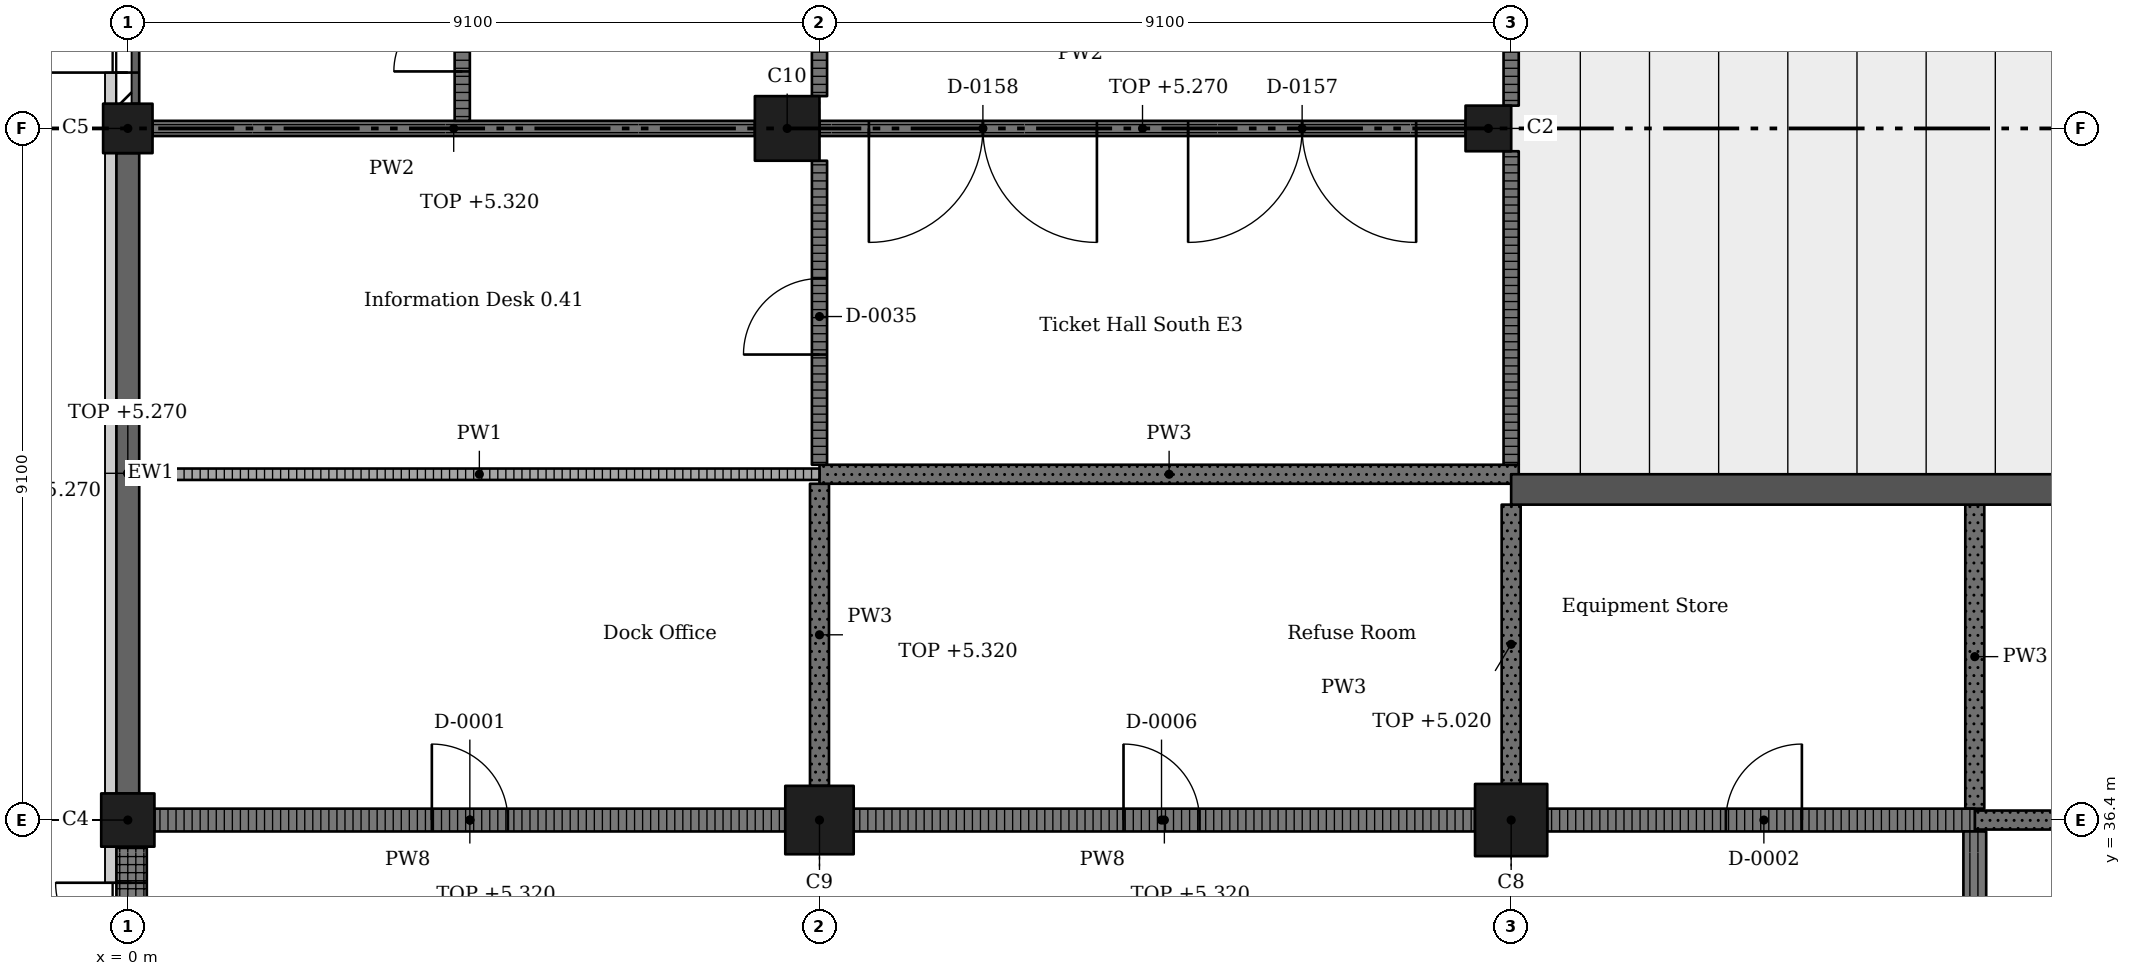
"""IFC4 building model, lengths in metres.
Left out: names, types, materials, properties, quantities, classifications, styles, units other than length and angle.
Written with IfcOpenShell. Run it as: python <this file> out.ifc"""

import sys

from ifc_helpers import new_model, si_unit, direction, frame, frame_2d, origin, origin_2d, place, context, subcontext, project, spatial, rectangle, extrude, element, fill, save


model = new_model("IFC4")
c1 = context("Model", 3, precision=1e-05, world=origin(), true_north=direction((0.0, 1.0)))
c2 = subcontext(c1, "Body", "Model", "MODEL_VIEW")
j1 = project(units=[si_unit("LENGTHUNIT", "METRE"), si_unit("PLANEANGLEUNIT", "RADIAN")], contexts=[c1])
p1 = place(None, origin())
s1 = spatial("IfcSite", under=j1, at=p1, CompositionType="ELEMENT")
p2 = place(p1, origin())
s2 = spatial("IfcBuilding", under=s1, at=p2, CompositionType="ELEMENT")
p3 = place(p2, origin())
s3 = spatial("IfcBuildingStorey", under=s2, at=p3, CompositionType="ELEMENT", Elevation=0.0)
p4 = place(p3, frame((0.0, 36.4, -0.4), z_axis=(0.0, 0.0, 1.0), x_axis=(1.0, 0.0, 0.0)))
e1 = element("IfcColumn", 1, at=p4, inside=s3, PredefinedType="COLUMN", context=c2, shape_type="SweptSolid", body=[
    extrude(rectangle(XDim=0.7, YDim=0.7, at=origin_2d()), origin(), (0.0, 0.0, 1.0), 6.77),
])
p5 = place(p3, frame((0.0, 45.5, -0.4), z_axis=(0.0, 0.0, 1.0), x_axis=(1.0, 0.0, 0.0)))
e2 = element("IfcColumn", 2, at=p5, inside=s3, PredefinedType="COLUMN", context=c2, shape_type="SweptSolid", body=[
    extrude(rectangle(XDim=0.65, YDim=0.65, at=origin_2d()), origin(), (0.0, 0.0, 1.0), 6.77),
])
p6 = place(p3, frame((9.1, 36.4, -0.4), z_axis=(0.0, 0.0, 1.0), x_axis=(1.0, 0.0, 0.0)))
e3 = element("IfcColumn", 3, at=p6, inside=s3, PredefinedType="COLUMN", context=c2, shape_type="SweptSolid", body=[
    extrude(rectangle(XDim=0.9, YDim=0.9, at=origin_2d()), origin(), (0.0, 0.0, 1.0), 6.77),
])
p7 = place(p3, frame((8.675, 45.5, -0.4), z_axis=(0.0, 0.0, 1.0), x_axis=(1.0, 0.0, 0.0)))
e4 = element("IfcColumn", 4, at=p7, inside=s3, PredefinedType="COLUMN", context=c2, shape_type="SweptSolid", body=[
    extrude(rectangle(XDim=0.85, YDim=0.85, at=origin_2d()), origin(), (0.0, 0.0, 1.0), 6.77),
])
p8 = place(p3, frame((18.2, 36.4, -0.4), z_axis=(0.0, 0.0, 1.0), x_axis=(1.0, 0.0, 0.0)))
e5 = element("IfcColumn", 5, at=p8, inside=s3, PredefinedType="COLUMN", context=c2, shape_type="SweptSolid", body=[
    extrude(rectangle(XDim=0.95, YDim=0.95, at=origin_2d()), origin(), (0.0, 0.0, 1.0), 6.77),
])
p9 = place(p3, frame((17.9, 45.5, -0.4), z_axis=(0.0, 0.0, 1.0), x_axis=(1.0, 0.0, 0.0)))
e6 = element("IfcColumn", 6, at=p9, inside=s3, PredefinedType="COLUMN", context=c2, shape_type="SweptSolid", body=[
    extrude(rectangle(XDim=0.6, YDim=0.6, at=origin_2d()), origin(), (0.0, 0.0, 1.0), 6.77),
])
p10 = place(p3, frame((36.4, 40.75, -0.4), z_axis=(0.0, 0.0, 1.0), x_axis=(-1.0, 0.0, 0.0)))
e7 = element("IfcWall", 7, at=p10, inside=s3, PredefinedType="SHEAR", context=c2, shape_type="SweptSolid", body=[
    extrude(rectangle(XDim=18.2, YDim=0.4, at=frame_2d((9.1, 0.0))), origin(), (0.0, 0.0, 1.0), 6.77),
])
p11 = place(p3, frame((0.0, 54.275, 0.0), z_axis=(0.0, 0.0, 1.0), x_axis=(0.0, -1.0, 0.0)))
e8 = element("IfcWall", 8, at=p11, inside=s3, PredefinedType="SOLIDWALL", context=c2, shape_type="SweptSolid", body=[
    extrude(rectangle(XDim=8.45, YDim=0.3, at=frame_2d((4.225, 0.0))), origin(), (0.0, 0.0, 1.0), 3.75),
])
p12 = place(p11, frame((4.44, 0.0, 0.0)))
e9 = element("IfcOpeningElement", 9, at=p12, cuts=e8, PredefinedType="OPENING", context=c2, shape_type="SweptSolid", body=[
    extrude(rectangle(XDim=3.6, YDim=2.7, at=frame_2d((1.8, 1.35))), frame((0.0, 0.16, 0.0), z_axis=(0.0, -1.0, 0.0), x_axis=(1.0, 0.0, 0.0)), (0.0, 0.0, 1.0), 0.32),
])
p13 = place(p11, frame((0.41, 0.0, 0.0)))
e10 = element("IfcOpeningElement", 10, at=p13, cuts=e8, PredefinedType="OPENING", context=c2, shape_type="SweptSolid", body=[
    extrude(rectangle(XDim=3.6, YDim=2.7, at=frame_2d((1.8, 1.35))), frame((0.0, 0.16, 0.0), z_axis=(0.0, -1.0, 0.0), x_axis=(1.0, 0.0, 0.0)), (0.0, 0.0, 1.0), 0.32),
])
p14 = place(p3, frame((0.0, 45.175, 0.0), z_axis=(0.0, 0.0, 1.0), x_axis=(0.0, -1.0, 0.0)))
e11 = element("IfcWall", 11, at=p14, inside=s3, PredefinedType="SOLIDWALL", context=c2, shape_type="SweptSolid", body=[
    extrude(rectangle(XDim=8.425, YDim=0.3, at=frame_2d((4.212, 0.0))), origin(), (0.0, 0.0, 1.0), 5.27),
])
p15 = place(p3, frame((0.05, 36.05, 0.0), z_axis=(0.0, 0.0, 1.0), x_axis=(0.0, -1.0, 0.0)))
e12 = element("IfcWall", 12, at=p15, inside=s3, PredefinedType="SOLIDWALL", context=c2, shape_type="SweptSolid", body=[
    extrude(rectangle(XDim=8.375, YDim=0.4, at=frame_2d((4.188, 0.0))), origin(), (0.0, 0.0, 1.0), 5.32),
])
p16 = place(p15, frame((1.95, 0.0, 0.0)))
e13 = element("IfcOpeningElement", 13, at=p16, cuts=e12, PredefinedType="OPENING", context=c2, shape_type="SweptSolid", body=[
    extrude(rectangle(XDim=4.5, YDim=4.8, at=frame_2d((2.25, 2.4))), frame((0.0, 0.21, 0.0), z_axis=(0.0, -1.0, 0.0), x_axis=(1.0, 0.0, 0.0)), (0.0, 0.0, 1.0), 0.42),
])
p17 = place(p15, frame((0.475, 0.0, 0.0)))
e14 = element("IfcOpeningElement", 14, at=p17, cuts=e12, PredefinedType="OPENING", context=c2, shape_type="SweptSolid", body=[
    extrude(rectangle(XDim=1.0, YDim=2.1, at=frame_2d((0.5, 1.05))), frame((0.0, 0.21, 0.0), z_axis=(0.0, -1.0, 0.0), x_axis=(1.0, 0.0, 0.0)), (0.0, 0.0, 1.0), 0.42),
])
p18 = place(p3, frame((0.15, 40.95, 0.0), z_axis=(0.0, 0.0, 1.0), x_axis=(1.0, 0.0, 0.0)))
e15 = element("IfcWall", 15, at=p18, inside=s3, PredefinedType="PARTITIONING", context=c2, shape_type="SweptSolid", body=[
    extrude(rectangle(XDim=8.95, YDim=0.15, at=frame_2d((4.475, 0.0))), origin(), (0.0, 0.0, 1.0), 6.02),
])
p19 = place(p3, frame((0.35, 36.4, 0.0), z_axis=(0.0, 0.0, 1.0), x_axis=(1.0, 0.0, 0.0)))
e16 = element("IfcWall", 16, at=p19, inside=s3, PredefinedType="SOLIDWALL", context=c2, shape_type="SweptSolid", body=[
    extrude(rectangle(XDim=8.3, YDim=0.3, at=frame_2d((4.15, 0.0))), origin(), (0.0, 0.0, 1.0), 5.32),
])
p20 = place(p19, frame((3.65, 0.0, 0.0)))
e17 = element("IfcOpeningElement", 17, at=p20, cuts=e16, PredefinedType="OPENING", context=c2, shape_type="SweptSolid", body=[
    extrude(rectangle(XDim=1.0, YDim=2.1, at=frame_2d((0.5, 1.05))), frame((0.0, 0.16, 0.0), z_axis=(0.0, -1.0, 0.0), x_axis=(1.0, 0.0, 0.0)), (0.0, 0.0, 1.0), 0.32),
])
p21 = place(p3, frame((0.325, 45.5, 0.0), z_axis=(0.0, 0.0, 1.0), x_axis=(1.0, 0.0, 0.0)))
e18 = element("IfcWall", 18, at=p21, inside=s3, PredefinedType="PARTITIONING", context=c2, shape_type="SweptSolid", body=[
    extrude(rectangle(XDim=7.925, YDim=0.2, at=frame_2d((3.962, 0.0))), origin(), (0.0, 0.0, 1.0), 5.32),
])
p22 = place(p3, frame((4.4, 45.6, 0.0), z_axis=(0.0, 0.0, 1.0), x_axis=(0.0, 1.0, 0.0)))
e19 = element("IfcWall", 19, at=p22, inside=s3, PredefinedType="PARTITIONING", context=c2, shape_type="SweptSolid", body=[
    extrude(rectangle(XDim=18.0, YDim=0.2, at=frame_2d((9.0, 0.0))), origin(), (0.0, 0.0, 1.0), 6.02),
])
p23 = place(p22, frame((0.65, 0.0, 0.0)))
e20 = element("IfcOpeningElement", 20, at=p23, cuts=e19, PredefinedType="OPENING", context=c2, shape_type="SweptSolid", body=[
    extrude(rectangle(XDim=1.8, YDim=2.4, at=frame_2d((0.9, 1.2))), frame((0.0, 0.11, 0.0), z_axis=(0.0, -1.0, 0.0), x_axis=(1.0, 0.0, 0.0)), (0.0, 0.0, 1.0), 0.22),
])
p24 = place(p22, frame((3.55, 0.0, 0.0)))
e21 = element("IfcOpeningElement", 21, at=p24, cuts=e19, PredefinedType="OPENING", context=c2, shape_type="SweptSolid", body=[
    extrude(rectangle(XDim=1.8, YDim=2.4, at=frame_2d((0.9, 1.2))), frame((0.0, 0.11, 0.0), z_axis=(0.0, -1.0, 0.0), x_axis=(1.0, 0.0, 0.0)), (0.0, 0.0, 1.0), 0.22),
])
p25 = place(p22, frame((6.65, 0.0, 0.0)))
e22 = element("IfcOpeningElement", 22, at=p25, cuts=e19, PredefinedType="OPENING", context=c2, shape_type="SweptSolid", body=[
    extrude(rectangle(XDim=1.8, YDim=2.4, at=frame_2d((0.9, 1.2))), frame((0.0, 0.11, 0.0), z_axis=(0.0, -1.0, 0.0), x_axis=(1.0, 0.0, 0.0)), (0.0, 0.0, 1.0), 0.22),
])
p26 = place(p22, frame((9.65, 0.0, 0.0)))
e23 = element("IfcOpeningElement", 23, at=p26, cuts=e19, PredefinedType="OPENING", context=c2, shape_type="SweptSolid", body=[
    extrude(rectangle(XDim=1.8, YDim=2.4, at=frame_2d((0.9, 1.2))), frame((0.0, 0.11, 0.0), z_axis=(0.0, -1.0, 0.0), x_axis=(1.0, 0.0, 0.0)), (0.0, 0.0, 1.0), 0.22),
])
p27 = place(p22, frame((12.65, 0.0, 0.0)))
e24 = element("IfcOpeningElement", 24, at=p27, cuts=e19, PredefinedType="OPENING", context=c2, shape_type="SweptSolid", body=[
    extrude(rectangle(XDim=1.8, YDim=2.4, at=frame_2d((0.9, 1.2))), frame((0.0, 0.11, 0.0), z_axis=(0.0, -1.0, 0.0), x_axis=(1.0, 0.0, 0.0)), (0.0, 0.0, 1.0), 0.22),
])
p28 = place(p22, frame((15.65, 0.0, 0.0)))
e25 = element("IfcOpeningElement", 25, at=p28, cuts=e19, PredefinedType="OPENING", context=c2, shape_type="SweptSolid", body=[
    extrude(rectangle(XDim=1.8, YDim=2.4, at=frame_2d((0.9, 1.2))), frame((0.0, 0.11, 0.0), z_axis=(0.0, -1.0, 0.0), x_axis=(1.0, 0.0, 0.0)), (0.0, 0.0, 1.0), 0.22),
])
p29 = place(p3, frame((9.1, 40.825, 0.0), z_axis=(0.0, 0.0, 1.0), x_axis=(0.0, -1.0, 0.0)))
e26 = element("IfcWall", 26, at=p29, inside=s3, PredefinedType="SOLIDWALL", context=c2, shape_type="SweptSolid", body=[
    extrude(rectangle(XDim=3.975, YDim=0.25, at=frame_2d((1.987, 0.0))), origin(), (0.0, 0.0, 1.0), 5.32),
])
p30 = place(p3, frame((9.1, 40.95, 0.0), z_axis=(0.0, 0.0, 1.0), x_axis=(1.0, 0.0, 0.0)))
e27 = element("IfcWall", 27, at=p30, inside=s3, PredefinedType="SOLIDWALL", context=c2, shape_type="SweptSolid", body=[
    extrude(rectangle(XDim=9.2, YDim=0.25, at=frame_2d((4.6, 0.0))), origin(), (0.0, 0.0, 1.0), 6.02),
])
p31 = place(p3, frame((9.1, 41.075, 0.0), z_axis=(0.0, 0.0, 1.0), x_axis=(0.0, 1.0, 0.0)))
e28 = element("IfcWall", 28, at=p31, inside=s3, PredefinedType="PARTITIONING", context=c2, shape_type="SweptSolid", body=[
    extrude(rectangle(XDim=4.0, YDim=0.2, at=frame_2d((2.0, 0.0))), origin(), (0.0, 0.0, 1.0), 5.32),
])
p32 = place(p31, frame((1.45, 0.0, 0.0)))
e29 = element("IfcOpeningElement", 29, at=p32, cuts=e28, PredefinedType="OPENING", context=c2, shape_type="SweptSolid", body=[
    extrude(rectangle(XDim=1.0, YDim=2.1, at=frame_2d((0.5, 1.05))), frame((0.0, 0.11, 0.0), z_axis=(0.0, -1.0, 0.0), x_axis=(1.0, 0.0, 0.0)), (0.0, 0.0, 1.0), 0.22),
])
p33 = place(p3, frame((9.1, 45.925, 0.0), z_axis=(0.0, 0.0, 1.0), x_axis=(0.0, 1.0, 0.0)))
e30 = element("IfcWall", 30, at=p33, inside=s3, PredefinedType="PARTITIONING", context=c2, shape_type="SweptSolid", body=[
    extrude(rectangle(XDim=8.25, YDim=0.2, at=frame_2d((4.125, 0.0))), origin(), (0.0, 0.0, 1.0), 5.32),
])
p34 = place(p33, frame((1.15, 0.0, 0.0)))
e31 = element("IfcOpeningElement", 31, at=p34, cuts=e30, PredefinedType="OPENING", context=c2, shape_type="SweptSolid", body=[
    extrude(rectangle(XDim=1.8, YDim=2.4, at=frame_2d((0.9, 1.2))), frame((0.0, 0.11, 0.0), z_axis=(0.0, -1.0, 0.0), x_axis=(1.0, 0.0, 0.0)), (0.0, 0.0, 1.0), 0.22),
])
p35 = place(p33, frame((5.25, 0.0, 0.0)))
e32 = element("IfcOpeningElement", 32, at=p35, cuts=e30, PredefinedType="OPENING", context=c2, shape_type="SweptSolid", body=[
    extrude(rectangle(XDim=1.8, YDim=2.4, at=frame_2d((0.9, 1.2))), frame((0.0, 0.11, 0.0), z_axis=(0.0, -1.0, 0.0), x_axis=(1.0, 0.0, 0.0)), (0.0, 0.0, 1.0), 0.22),
])
p36 = place(p33, frame((3.45, 0.0, 0.0)))
e33 = element("IfcOpeningElement", 33, at=p36, cuts=e30, PredefinedType="OPENING", context=c2, shape_type="SweptSolid", body=[
    extrude(rectangle(XDim=1.8, YDim=2.4, at=frame_2d((0.9, 1.2))), frame((0.0, 0.11, 0.0), z_axis=(0.0, -1.0, 0.0), x_axis=(1.0, 0.0, 0.0)), (0.0, 0.0, 1.0), 0.22),
])
p37 = place(p3, frame((9.55, 36.4, 0.0), z_axis=(0.0, 0.0, 1.0), x_axis=(1.0, 0.0, 0.0)))
e34 = element("IfcWall", 34, at=p37, inside=s3, PredefinedType="SOLIDWALL", context=c2, shape_type="SweptSolid", body=[
    extrude(rectangle(XDim=8.175, YDim=0.3, at=frame_2d((4.087, 0.0))), origin(), (0.0, 0.0, 1.0), 5.32),
])
p38 = place(p37, frame((3.55, 0.0, 0.0)))
e35 = element("IfcOpeningElement", 35, at=p38, cuts=e34, PredefinedType="OPENING", context=c2, shape_type="SweptSolid", body=[
    extrude(rectangle(XDim=1.0, YDim=2.1, at=frame_2d((0.5, 1.05))), frame((0.0, 0.16, 0.0), z_axis=(0.0, -1.0, 0.0), x_axis=(1.0, 0.0, 0.0)), (0.0, 0.0, 1.0), 0.32),
])
p39 = place(p3, frame((17.6, 45.5, 0.0), z_axis=(0.0, 0.0, 1.0), x_axis=(-1.0, 0.0, 0.0)))
e36 = element("IfcWall", 36, at=p39, inside=s3, PredefinedType="PARTITIONING", context=c2, shape_type="SweptSolid", body=[
    extrude(rectangle(XDim=8.5, YDim=0.2, at=frame_2d((4.25, 0.0))), origin(), (0.0, 0.0, 1.0), 5.27),
])
p40 = place(p39, frame((0.65, 0.0, 0.0)))
e37 = element("IfcOpeningElement", 37, at=p40, cuts=e36, PredefinedType="OPENING", context=c2, shape_type="SweptSolid", body=[
    extrude(rectangle(XDim=3.0, YDim=2.4, at=frame_2d((1.5, 1.2))), frame((0.0, 0.11, 0.0), z_axis=(0.0, -1.0, 0.0), x_axis=(1.0, 0.0, 0.0)), (0.0, 0.0, 1.0), 0.22),
])
p41 = place(p39, frame((4.85, 0.0, 0.0)))
e38 = element("IfcOpeningElement", 38, at=p41, cuts=e36, PredefinedType="OPENING", context=c2, shape_type="SweptSolid", body=[
    extrude(rectangle(XDim=3.0, YDim=2.4, at=frame_2d((1.5, 1.2))), frame((0.0, 0.11, 0.0), z_axis=(0.0, -1.0, 0.0), x_axis=(1.0, 0.0, 0.0)), (0.0, 0.0, 1.0), 0.22),
])
p42 = place(p3, frame((18.2, 40.55, 0.0), z_axis=(0.0, 0.0, 1.0), x_axis=(0.0, -1.0, 0.0)))
e39 = element("IfcWall", 39, at=p42, inside=s3, PredefinedType="SOLIDWALL", context=c2, shape_type="SweptSolid", body=[
    extrude(rectangle(XDim=3.675, YDim=0.25, at=frame_2d((1.837, 0.0))), origin(), (0.0, 0.0, 1.0), 5.02),
])
p43 = place(p3, frame((18.2, 45.2, 0.0), z_axis=(0.0, 0.0, 1.0), x_axis=(0.0, -1.0, 0.0)))
e40 = element("IfcWall", 40, at=p43, inside=s3, PredefinedType="PARTITIONING", context=c2, shape_type="SweptSolid", body=[
    extrude(rectangle(XDim=4.125, YDim=0.2, at=frame_2d((2.062, 0.0))), origin(), (0.0, 0.0, 1.0), 5.02),
])
p44 = place(p3, frame((18.2, 54.3, 0.0), z_axis=(0.0, 0.0, 1.0), x_axis=(0.0, -1.0, 0.0)))
e41 = element("IfcWall", 41, at=p44, inside=s3, PredefinedType="PARTITIONING", context=c2, shape_type="SweptSolid", body=[
    extrude(rectangle(XDim=8.5, YDim=0.2, at=frame_2d((4.25, 0.0))), origin(), (0.0, 0.0, 1.0), 5.02),
])
p45 = place(p3, frame((18.675, 36.4, 0.0), z_axis=(0.0, 0.0, 1.0), x_axis=(1.0, 0.0, 0.0)))
e42 = element("IfcWall", 42, at=p45, inside=s3, PredefinedType="SOLIDWALL", context=c2, shape_type="SweptSolid", body=[
    extrude(rectangle(XDim=5.625, YDim=0.3, at=frame_2d((2.812, 0.0))), origin(), (0.0, 0.0, 1.0), 5.32),
])
p46 = place(p45, frame((2.35, 0.0, 0.0)))
e43 = element("IfcOpeningElement", 43, at=p46, cuts=e42, PredefinedType="OPENING", context=c2, shape_type="SweptSolid", body=[
    extrude(rectangle(XDim=1.0, YDim=2.1, at=frame_2d((0.5, 1.05))), frame((0.0, 0.16, 0.0), z_axis=(0.0, -1.0, 0.0), x_axis=(1.0, 0.0, 0.0)), (0.0, 0.0, 1.0), 0.32),
])
p47 = place(p3, frame((24.3, 36.25, 0.0), z_axis=(0.0, 0.0, 1.0), x_axis=(0.0, -1.0, 0.0)))
e44 = element("IfcWall", 44, at=p47, inside=s3, PredefinedType="SOLIDWALL", context=c2, shape_type="SweptSolid", body=[
    extrude(rectangle(XDim=6.32, YDim=0.3, at=frame_2d((3.16, 0.0))), origin(), (0.0, 0.0, 1.0), 6.02),
])
p48 = place(p3, frame((24.3, 36.4, 0.0), z_axis=(0.0, 0.0, 1.0), x_axis=(1.0, 0.0, 0.0)))
e45 = element("IfcWall", 45, at=p48, inside=s3, PredefinedType="SOLIDWALL", context=c2, shape_type="SweptSolid", body=[
    extrude(rectangle(XDim=2.525, YDim=0.25, at=frame_2d((1.262, 0.0))), origin(), (0.0, 0.0, 1.0), 5.32),
])
p49 = place(p3, frame((24.3, 40.55, 0.0), z_axis=(0.0, 0.0, 1.0), x_axis=(0.0, -1.0, 0.0)))
e46 = element("IfcWall", 46, at=p49, inside=s3, PredefinedType="SOLIDWALL", context=c2, shape_type="SweptSolid", body=[
    extrude(rectangle(XDim=4.0, YDim=0.25, at=frame_2d((2.0, 0.0))), origin(), (0.0, 0.0, 1.0), 6.02),
])
p50 = place(p12, frame((3.6, 0.0, 0.0), z_axis=(0.0, 0.0, 1.0), x_axis=(-1.0, 0.0, 0.0)))
e47 = element("IfcDoor", 47, at=p50, inside=s3, OperationType="DOUBLE_DOOR_SINGLE_SWING", PredefinedType="DOOR", context=c2, shape_type="SweptSolid", body=[
    extrude(rectangle(XDim=3.6, YDim=2.7, at=frame_2d((1.8, 1.35))), frame((0.0, 0.025, 0.0), z_axis=(0.0, -1.0, 0.0), x_axis=(1.0, 0.0, 0.0)), (0.0, 0.0, 1.0), 0.05),
])
fill(e9, e47)
p51 = place(p17, frame((1.0, 0.0, 0.0), z_axis=(0.0, 0.0, 1.0), x_axis=(-1.0, 0.0, 0.0)))
e48 = element("IfcDoor", 48, at=p51, inside=s3, OperationType="SINGLE_SWING_LEFT", PredefinedType="DOOR", context=c2, shape_type="SweptSolid", body=[
    extrude(rectangle(XDim=1.0, YDim=2.1, at=frame_2d((0.5, 1.05))), frame((0.0, 0.025, 0.0), z_axis=(0.0, -1.0, 0.0), x_axis=(1.0, 0.0, 0.0)), (0.0, 0.0, 1.0), 0.05),
])
fill(e14, e48)
p52 = place(p20, origin())
e49 = element("IfcDoor", 49, at=p52, inside=s3, OperationType="SINGLE_SWING_RIGHT", PredefinedType="DOOR", context=c2, shape_type="SweptSolid", body=[
    extrude(rectangle(XDim=1.0, YDim=2.1, at=frame_2d((0.5, 1.05))), frame((0.0, 0.025, 0.0), z_axis=(0.0, -1.0, 0.0), x_axis=(1.0, 0.0, 0.0)), (0.0, 0.0, 1.0), 0.05),
])
fill(e17, e49)
p53 = place(p46, origin())
e50 = element("IfcDoor", 50, at=p53, inside=s3, OperationType="SINGLE_SWING_LEFT", PredefinedType="DOOR", context=c2, shape_type="SweptSolid", body=[
    extrude(rectangle(XDim=1.0, YDim=2.1, at=frame_2d((0.5, 1.05))), frame((0.0, 0.025, 0.0), z_axis=(0.0, -1.0, 0.0), x_axis=(1.0, 0.0, 0.0)), (0.0, 0.0, 1.0), 0.05),
])
fill(e43, e50)
p54 = place(p38, origin())
e51 = element("IfcDoor", 51, at=p54, inside=s3, OperationType="SINGLE_SWING_RIGHT", PredefinedType="DOOR", context=c2, shape_type="SweptSolid", body=[
    extrude(rectangle(XDim=1.0, YDim=2.1, at=frame_2d((0.5, 1.05))), frame((0.0, 0.025, 0.0), z_axis=(0.0, -1.0, 0.0), x_axis=(1.0, 0.0, 0.0)), (0.0, 0.0, 1.0), 0.05),
])
fill(e35, e51)
p55 = place(p32, origin())
e52 = element("IfcDoor", 52, at=p55, inside=s3, OperationType="SINGLE_SWING_RIGHT", PredefinedType="DOOR", context=c2, shape_type="SweptSolid", body=[
    extrude(rectangle(XDim=1.0, YDim=2.1, at=frame_2d((0.5, 1.05))), frame((0.0, 0.025, 0.0), z_axis=(0.0, -1.0, 0.0), x_axis=(1.0, 0.0, 0.0)), (0.0, 0.0, 1.0), 0.05),
])
fill(e29, e52)
p56 = place(p40, origin())
e53 = element("IfcDoor", 53, at=p56, inside=s3, OperationType="DOUBLE_DOOR_SINGLE_SWING", PredefinedType="DOOR", context=c2, shape_type="SweptSolid", body=[
    extrude(rectangle(XDim=3.0, YDim=2.4, at=frame_2d((1.5, 1.2))), frame((0.0, 0.025, 0.0), z_axis=(0.0, -1.0, 0.0), x_axis=(1.0, 0.0, 0.0)), (0.0, 0.0, 1.0), 0.05),
])
fill(e37, e53)
p57 = place(p41, origin())
e54 = element("IfcDoor", 54, at=p57, inside=s3, OperationType="DOUBLE_DOOR_SINGLE_SWING", PredefinedType="DOOR", context=c2, shape_type="SweptSolid", body=[
    extrude(rectangle(XDim=3.0, YDim=2.4, at=frame_2d((1.5, 1.2))), frame((0.0, 0.025, 0.0), z_axis=(0.0, -1.0, 0.0), x_axis=(1.0, 0.0, 0.0)), (0.0, 0.0, 1.0), 0.05),
])
fill(e38, e54)
p58 = place(p23, origin())
e55 = element("IfcDoor", 55, at=p58, inside=s3, OperationType="DOUBLE_DOOR_SINGLE_SWING", PredefinedType="DOOR", context=c2, shape_type="SweptSolid", body=[
    extrude(rectangle(XDim=1.8, YDim=2.4, at=frame_2d((0.9, 1.2))), frame((0.0, 0.025, 0.0), z_axis=(0.0, -1.0, 0.0), x_axis=(1.0, 0.0, 0.0)), (0.0, 0.0, 1.0), 0.05),
])
fill(e20, e55)
save(model, sys.argv[1])
